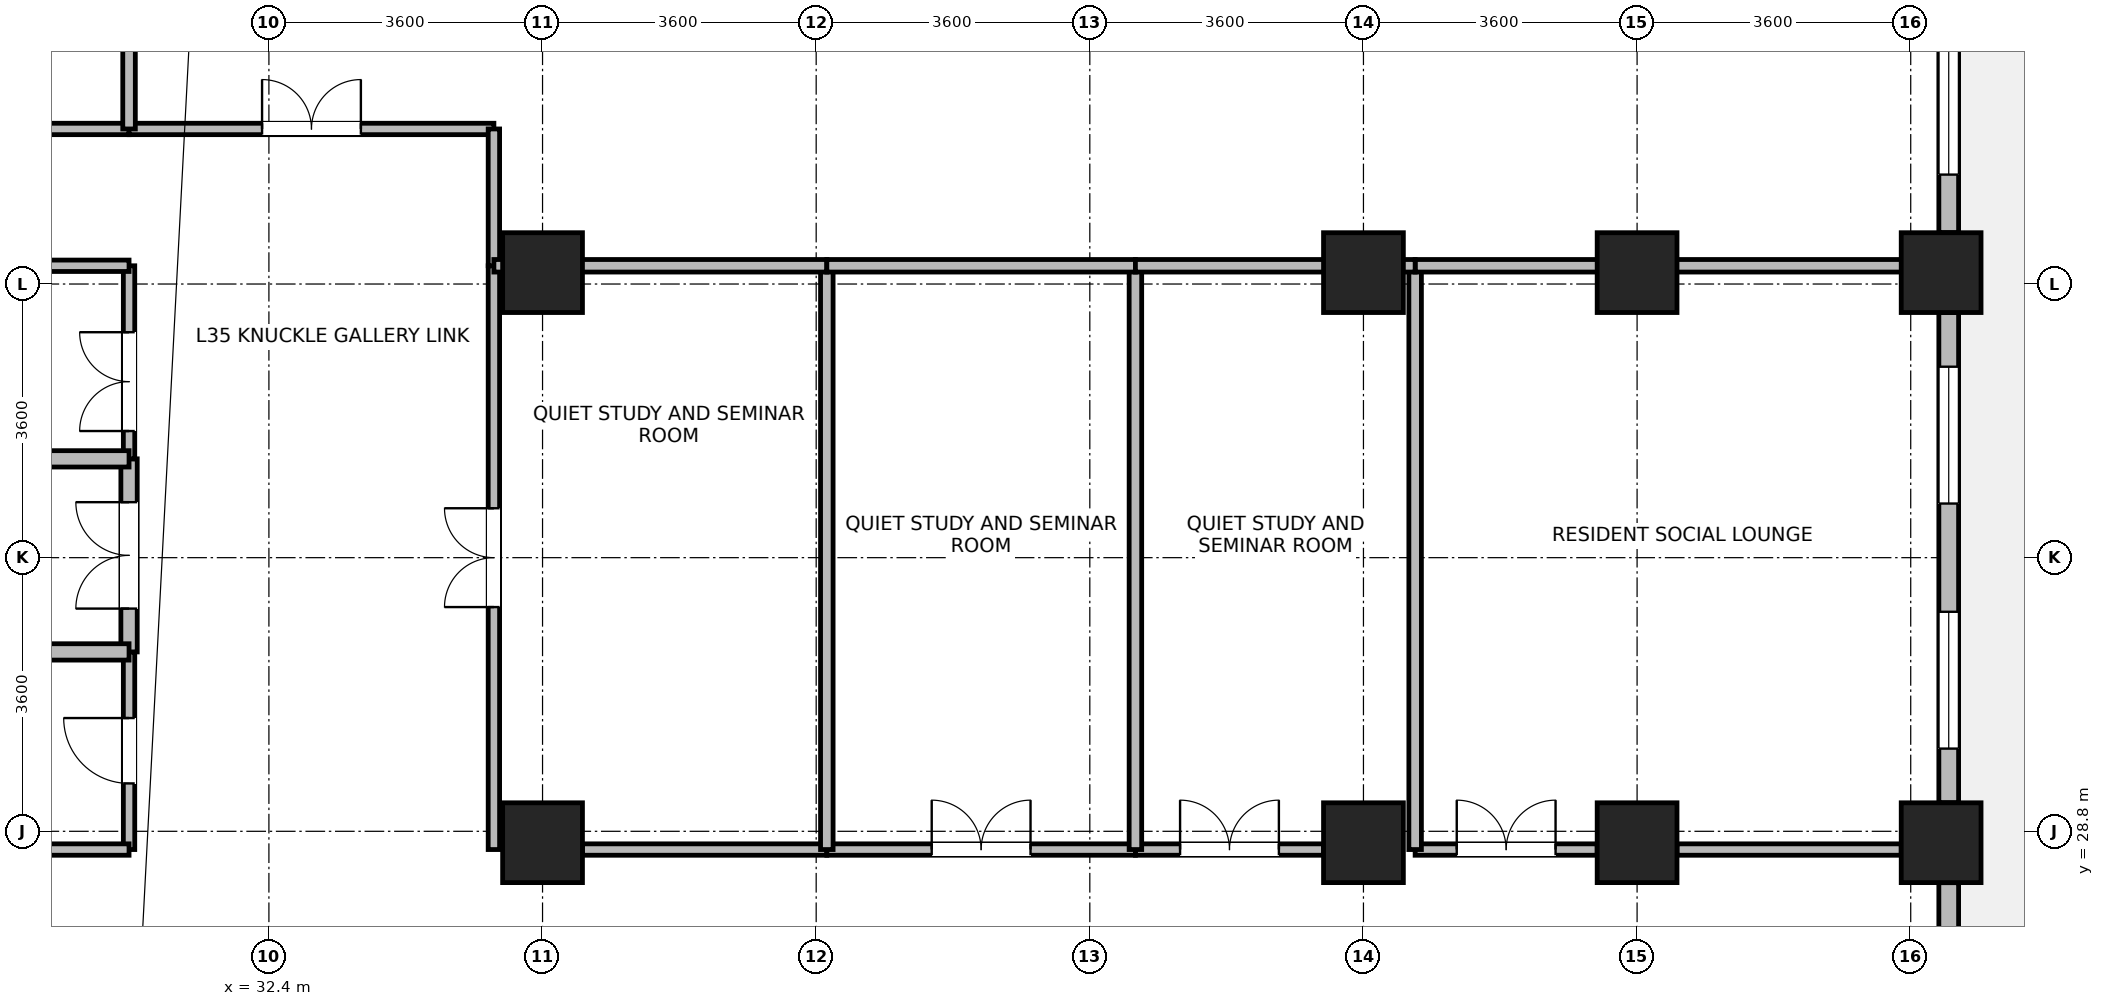
"""IFC4 building model, lengths in metres.
Left out: names, types, materials, properties, quantities, classifications, styles, units other than length and angle.
Written with IfcOpenShell. Run it as: python <this file> out.ifc"""

import sys

from ifc_helpers import new_model, si_unit, direction, frame, frame_2d, origin, origin_2d, place, context, subcontext, project, spatial, rectangle, extrude, source, transform, mapped, element, fill, save


model = new_model("IFC4")
c1 = context("Model", 3, precision=1e-05, world=origin(), true_north=direction((0.0, 1.0)))
c2 = subcontext(c1, "Body", "Model", "MODEL_VIEW")
j1 = project(units=[si_unit("LENGTHUNIT", "METRE"), si_unit("PLANEANGLEUNIT", "RADIAN")], contexts=[c1])
p1 = place(None, origin())
s1 = spatial("IfcSite", under=j1, at=p1, CompositionType="ELEMENT")
p2 = place(p1, origin())
s2 = spatial("IfcBuilding", under=s1, at=p2, CompositionType="ELEMENT")
p3 = place(p2, frame((0.0, 0.0, 140.2)))
s3 = spatial("IfcBuildingStorey", under=s2, at=p3, CompositionType="ELEMENT", Elevation=140.2)
m1 = source(origin(), c2, "Body", "SweptSolid", [
    extrude(rectangle(XDim=1.05, YDim=1.05, at=origin_2d()), origin(), (0.0, 0.0, 1.0), 3.7),
])
for number, where, z_axis, x_axis in (
    (1, (36.0, 28.65, 0.0), (0.0, 0.0, 1.0), (1.0, 0.0, 0.0)),
    (2, (36.0, 36.15, 0.0), (0.0, 0.0, 1.0), (1.0, 0.0, 0.0)),
    (3, (46.8, 28.65, 0.0), (0.0, 0.0, 1.0), (1.0, 0.0, 0.0)),
    (4, (46.8, 36.15, 0.0), (0.0, 0.0, 1.0), (1.0, 0.0, 0.0)),
    (5, (50.4, 28.65, 0.0), (0.0, 0.0, 1.0), (1.0, 0.0, 0.0)),
    (6, (50.4, 36.15, 0.0), (0.0, 0.0, 1.0), (1.0, 0.0, 0.0)),
    (7, (54.4, 28.65, 0.0), (0.0, 0.0, 1.0), (1.0, 0.0, 0.0)),
    (8, (54.4, 36.15, 0.0), (0.0, 0.0, 1.0), (1.0, 0.0, 0.0)),
):
    element("IfcColumn", number, at=place(p3, frame(where, z_axis=z_axis, x_axis=x_axis)), inside=s3, PredefinedType="COLUMN", context=c2, shape_type="MappedRepresentation", body=[
        mapped(m1, transform((0.0, 0.0, 0.0), x_axis=(1.0, 0.0, 0.0), y_axis=(0.0, 1.0, 0.0), z_axis=(0.0, 0.0, 1.0), scale=1.0)),
    ])
p4 = place(p3, frame((54.5, 28.124, 0.0), z_axis=(0.0, 0.0, 1.0), x_axis=(0.0, -1.0, 0.0)))
e9 = element("IfcWall", 9, at=p4, inside=s3, PredefinedType="STANDARD", context=c2, shape_type="SweptSolid", body=[
    extrude(rectangle(XDim=5.998, YDim=0.26, at=frame_2d((2.999, 0.0))), origin(), (0.0, 0.0, 1.0), 2.99),
])
p5 = place(p4, frame((3.598, 0.0, 0.85)))
e10 = element("IfcOpeningElement", 10, at=p5, cuts=e9, PredefinedType="OPENING", context=c2, shape_type="SweptSolid", body=[
    extrude(rectangle(XDim=1.8, YDim=1.85, at=frame_2d((0.9, 0.925))), frame((0.0, 0.14, 0.0), z_axis=(0.0, -1.0, 0.0), x_axis=(1.0, 0.0, 0.0)), (0.0, 0.0, 1.0), 0.28),
])
p6 = place(p4, frame((2.044, 0.0, 0.85)))
e11 = element("IfcOpeningElement", 11, at=p6, cuts=e9, PredefinedType="OPENING", context=c2, shape_type="SweptSolid", body=[
    extrude(rectangle(XDim=0.95, YDim=1.75, at=frame_2d((0.475, 0.875))), frame((0.0, 0.14, 0.0), z_axis=(0.0, -1.0, 0.0), x_axis=(1.0, 0.0, 0.0)), (0.0, 0.0, 1.0), 0.28),
])
p7 = place(p3, frame((54.5, 35.624, 0.0), z_axis=(0.0, 0.0, 1.0), x_axis=(0.0, -1.0, 0.0)))
e12 = element("IfcWall", 12, at=p7, inside=s3, PredefinedType="STANDARD", context=c2, shape_type="SweptSolid", body=[
    extrude(rectangle(XDim=6.448, YDim=0.26, at=frame_2d((3.224, 0.0))), origin(), (0.0, 0.0, 1.0), 2.99),
])
p8 = place(p7, frame((0.712, 0.0, 0.85)))
e13 = element("IfcOpeningElement", 13, at=p8, cuts=e12, PredefinedType="OPENING", context=c2, shape_type="SweptSolid", body=[
    extrude(rectangle(XDim=1.8, YDim=1.85, at=frame_2d((0.9, 0.925))), frame((0.0, 0.14, 0.0), z_axis=(0.0, -1.0, 0.0), x_axis=(1.0, 0.0, 0.0)), (0.0, 0.0, 1.0), 0.28),
])
p9 = place(p7, frame((3.936, 0.0, 0.85)))
e14 = element("IfcOpeningElement", 14, at=p9, cuts=e12, PredefinedType="OPENING", context=c2, shape_type="SweptSolid", body=[
    extrude(rectangle(XDim=1.8, YDim=1.85, at=frame_2d((0.9, 0.925))), frame((0.0, 0.14, 0.0), z_axis=(0.0, -1.0, 0.0), x_axis=(1.0, 0.0, 0.0)), (0.0, 0.0, 1.0), 0.28),
])
p10 = place(p3, frame((54.5, 43.33, 0.0), z_axis=(0.0, 0.0, 1.0), x_axis=(0.0, -1.0, 0.0)))
e15 = element("IfcWall", 15, at=p10, inside=s3, PredefinedType="STANDARD", context=c2, shape_type="SweptSolid", body=[
    extrude(rectangle(XDim=6.654, YDim=0.26, at=frame_2d((3.327, 0.0))), origin(), (0.0, 0.0, 1.0), 3.44),
])
p11 = place(p10, frame((0.763, 0.0, 0.85)))
e16 = element("IfcOpeningElement", 16, at=p11, cuts=e15, PredefinedType="OPENING", context=c2, shape_type="SweptSolid", body=[
    extrude(rectangle(XDim=1.8, YDim=1.85, at=frame_2d((0.9, 0.925))), frame((0.0, 0.14, 0.0), z_axis=(0.0, -1.0, 0.0), x_axis=(1.0, 0.0, 0.0)), (0.0, 0.0, 1.0), 0.28),
])
p12 = place(p10, frame((4.091, 0.0, 0.85)))
e17 = element("IfcOpeningElement", 17, at=p12, cuts=e15, PredefinedType="OPENING", context=c2, shape_type="SweptSolid", body=[
    extrude(rectangle(XDim=1.8, YDim=1.85, at=frame_2d((0.9, 0.925))), frame((0.0, 0.14, 0.0), z_axis=(0.0, -1.0, 0.0), x_axis=(1.0, 0.0, 0.0)), (0.0, 0.0, 1.0), 0.28),
])
p13 = place(p3, frame((35.36, 28.56, 0.0), z_axis=(0.0, 0.0, 1.0), x_axis=(0.0, 1.0, 0.0)))
e18 = element("IfcWall", 18, at=p13, inside=s3, PredefinedType="PARTITIONING", context=c2, shape_type="SweptSolid", body=[
    extrude(rectangle(XDim=7.68, YDim=0.15, at=frame_2d((3.84, 0.0))), origin(), (0.0, 0.0, 1.0), 3.44),
])
p14 = place(p13, frame((3.19, 0.0, 0.0)))
e19 = element("IfcOpeningElement", 19, at=p14, cuts=e18, PredefinedType="OPENING", context=c2, shape_type="SweptSolid", body=[
    extrude(rectangle(XDim=1.3, YDim=2.12, at=frame_2d((0.65, 1.06))), frame((0.0, 0.085, 0.0), z_axis=(0.0, -1.0, 0.0), x_axis=(1.0, 0.0, 0.0)), (0.0, 0.0, 1.0), 0.17),
])
p15 = place(p3, frame((47.48, 28.56, 0.0), z_axis=(0.0, 0.0, 1.0), x_axis=(1.0, 0.0, 0.0)))
e20 = element("IfcWall", 20, at=p15, inside=s3, PredefinedType="PARTITIONING", context=c2, shape_type="SweptSolid", body=[
    extrude(rectangle(XDim=2.395, YDim=0.15, at=frame_2d((1.198, 0.0))), origin(), (0.0, 0.0, 1.0), 2.84),
])
p16 = place(p15, frame((0.548, 0.0, 0.0)))
e21 = element("IfcOpeningElement", 21, at=p16, cuts=e20, PredefinedType="OPENING", context=c2, shape_type="SweptSolid", body=[
    extrude(rectangle(XDim=1.3, YDim=2.12, at=frame_2d((0.65, 1.06))), frame((0.0, 0.085, 0.0), z_axis=(0.0, -1.0, 0.0), x_axis=(1.0, 0.0, 0.0)), (0.0, 0.0, 1.0), 0.17),
])
p17 = place(p3, frame((50.925, 28.56, 0.0), z_axis=(0.0, 0.0, 1.0), x_axis=(1.0, 0.0, 0.0)))
e22 = element("IfcWall", 22, at=p17, inside=s3, PredefinedType="PARTITIONING", context=c2, shape_type="SweptSolid", body=[
    extrude(rectangle(XDim=2.95, YDim=0.15, at=frame_2d((1.475, 0.0))), origin(), (0.0, 0.0, 1.0), 2.84),
])
p18 = place(p3, frame((25.08, 38.04, 0.0), z_axis=(0.0, 0.0, 1.0), x_axis=(1.0, 0.0, 0.0)))
e23 = element("IfcWall", 23, at=p18, inside=s3, PredefinedType="PARTITIONING", context=c2, shape_type="SweptSolid", body=[
    extrude(rectangle(XDim=5.48, YDim=0.15, at=frame_2d((2.74, 0.0))), origin(), (0.0, 0.0, 1.0), 3.44),
])
p19 = place(p18, frame((2.09, 0.0, 0.0)))
e24 = element("IfcOpeningElement", 24, at=p19, cuts=e23, PredefinedType="OPENING", context=c2, shape_type="SweptSolid", body=[
    extrude(rectangle(XDim=1.3, YDim=2.12, at=frame_2d((0.65, 1.06))), frame((0.0, 0.085, 0.0), z_axis=(0.0, -1.0, 0.0), x_axis=(1.0, 0.0, 0.0)), (0.0, 0.0, 1.0), 0.17),
])
p20 = place(p3, frame((30.56, 38.04, 0.0), z_axis=(0.0, 0.0, 1.0), x_axis=(1.0, 0.0, 0.0)))
e25 = element("IfcWall", 25, at=p20, inside=s3, PredefinedType="PARTITIONING", context=c2, shape_type="SweptSolid", body=[
    extrude(rectangle(XDim=4.8, YDim=0.15, at=frame_2d((2.4, 0.0))), origin(), (0.0, 0.0, 1.0), 3.44),
])
p21 = place(p20, frame((1.75, 0.0, 0.0)))
e26 = element("IfcOpeningElement", 26, at=p21, cuts=e25, PredefinedType="OPENING", context=c2, shape_type="SweptSolid", body=[
    extrude(rectangle(XDim=1.3, YDim=2.12, at=frame_2d((0.65, 1.06))), frame((0.0, 0.085, 0.0), z_axis=(0.0, -1.0, 0.0), x_axis=(1.0, 0.0, 0.0)), (0.0, 0.0, 1.0), 0.17),
])
p22 = place(p3, frame((36.525, 28.56, 0.0), z_axis=(0.0, 0.0, 1.0), x_axis=(1.0, 0.0, 0.0)))
e27 = element("IfcWall", 27, at=p22, inside=s3, PredefinedType="PARTITIONING", context=c2, shape_type="SweptSolid", body=[
    extrude(rectangle(XDim=3.215, YDim=0.15, at=frame_2d((1.607, 0.0))), origin(), (0.0, 0.0, 1.0), 2.84),
])
p23 = place(p3, frame((39.74, 28.56, 0.0), z_axis=(0.0, 0.0, 1.0), x_axis=(1.0, 0.0, 0.0)))
e28 = element("IfcWall", 28, at=p23, inside=s3, PredefinedType="PARTITIONING", context=c2, shape_type="SweptSolid", body=[
    extrude(rectangle(XDim=4.06, YDim=0.15, at=frame_2d((2.03, 0.0))), origin(), (0.0, 0.0, 1.0), 2.84),
])
p24 = place(p23, frame((1.38, 0.0, 0.0)))
e29 = element("IfcOpeningElement", 29, at=p24, cuts=e28, PredefinedType="OPENING", context=c2, shape_type="SweptSolid", body=[
    extrude(rectangle(XDim=1.3, YDim=2.12, at=frame_2d((0.65, 1.06))), frame((0.0, 0.085, 0.0), z_axis=(0.0, -1.0, 0.0), x_axis=(1.0, 0.0, 0.0)), (0.0, 0.0, 1.0), 0.17),
])
p25 = place(p3, frame((43.8, 28.56, 0.0), z_axis=(0.0, 0.0, 1.0), x_axis=(1.0, 0.0, 0.0)))
e30 = element("IfcWall", 30, at=p25, inside=s3, PredefinedType="PARTITIONING", context=c2, shape_type="SweptSolid", body=[
    extrude(rectangle(XDim=2.475, YDim=0.15, at=frame_2d((1.237, 0.0))), origin(), (0.0, 0.0, 1.0), 2.84),
])
p26 = place(p25, frame((0.587, 0.0, 0.0)))
e31 = element("IfcOpeningElement", 31, at=p26, cuts=e30, PredefinedType="OPENING", context=c2, shape_type="SweptSolid", body=[
    extrude(rectangle(XDim=1.3, YDim=2.12, at=frame_2d((0.65, 1.06))), frame((0.0, 0.085, 0.0), z_axis=(0.0, -1.0, 0.0), x_axis=(1.0, 0.0, 0.0)), (0.0, 0.0, 1.0), 0.17),
])
p27 = place(p3, frame((30.56, 28.56, 0.0), z_axis=(0.0, 0.0, 1.0), x_axis=(0.0, 1.0, 0.0)))
e32 = element("IfcWall", 32, at=p27, inside=s3, PredefinedType="PARTITIONING", context=c2, shape_type="SweptSolid", body=[
    extrude(rectangle(XDim=2.6, YDim=0.15, at=frame_2d((1.3, 0.0))), origin(), (0.0, 0.0, 1.0), 3.44),
])
p28 = place(p27, frame((0.87, 0.0, 0.0)))
e33 = element("IfcOpeningElement", 33, at=p28, cuts=e32, PredefinedType="OPENING", context=c2, shape_type="SweptSolid", body=[
    extrude(rectangle(XDim=0.86, YDim=2.02, at=frame_2d((0.43, 1.01))), frame((0.0, 0.085, 0.0), z_axis=(0.0, -1.0, 0.0), x_axis=(1.0, 0.0, 0.0)), (0.0, 0.0, 1.0), 0.17),
])
p29 = place(p3, frame((30.56, 31.16, 0.0), z_axis=(0.0, 0.0, 1.0), x_axis=(0.0, 1.0, 0.0)))
e34 = element("IfcWall", 34, at=p29, inside=s3, PredefinedType="PARTITIONING", context=c2, shape_type="SweptSolid", body=[
    extrude(rectangle(XDim=2.54, YDim=0.215, at=frame_2d((1.27, 0.0))), origin(), (0.0, 0.0, 1.0), 3.44),
])
p30 = place(p29, frame((0.57, 0.0, 0.0)))
e35 = element("IfcOpeningElement", 35, at=p30, cuts=e34, PredefinedType="OPENING", context=c2, shape_type="SweptSolid", body=[
    extrude(rectangle(XDim=1.4, YDim=2.15, at=frame_2d((0.7, 1.075))), frame((0.0, 0.118, 0.0), z_axis=(0.0, -1.0, 0.0), x_axis=(1.0, 0.0, 0.0)), (0.0, 0.0, 1.0), 0.235),
])
p31 = place(p3, frame((30.56, 33.7, 0.0), z_axis=(0.0, 0.0, 1.0), x_axis=(0.0, 1.0, 0.0)))
e36 = element("IfcWall", 36, at=p31, inside=s3, PredefinedType="PARTITIONING", context=c2, shape_type="SweptSolid", body=[
    extrude(rectangle(XDim=2.54, YDim=0.15, at=frame_2d((1.27, 0.0))), origin(), (0.0, 0.0, 1.0), 3.44),
])
p32 = place(p31, frame((0.366, 0.0, 0.0)))
e37 = element("IfcOpeningElement", 37, at=p32, cuts=e36, PredefinedType="OPENING", context=c2, shape_type="SweptSolid", body=[
    extrude(rectangle(XDim=1.3, YDim=2.12, at=frame_2d((0.65, 1.06))), frame((0.0, 0.085, 0.0), z_axis=(0.0, -1.0, 0.0), x_axis=(1.0, 0.0, 0.0)), (0.0, 0.0, 1.0), 0.17),
])
p33 = place(p3, frame((35.36, 36.24, 0.0), z_axis=(0.0, 0.0, 1.0), x_axis=(0.0, 1.0, 0.0)))
e38 = element("IfcWall", 38, at=p33, inside=s3, PredefinedType="PARTITIONING", context=c2, shape_type="SweptSolid", body=[
    extrude(rectangle(XDim=1.8, YDim=0.15, at=frame_2d((0.9, 0.0))), origin(), (0.0, 0.0, 1.0), 3.44),
])
for number, where, z_axis, x_axis in (
    (39, (29.325, 28.56, 0.0), (0.0, 0.0, 1.0), (1.0, 0.0, 0.0)),
    (40, (29.325, 36.24, 0.0), (0.0, 0.0, 1.0), (1.0, 0.0, 0.0)),
):
    element("IfcWall", number, at=place(p3, frame(where, z_axis=z_axis, x_axis=x_axis)), inside=s3, PredefinedType="PARTITIONING", context=c2, shape_type="SweptSolid", body=[
        extrude(rectangle(XDim=1.235, YDim=0.15, at=frame_2d((0.618, 0.0))), origin(), (0.0, 0.0, 1.0), 2.84),
    ])
for number, where, z_axis, x_axis in (
    (41, (39.74, 28.56, 0.0), (0.0, 0.0, 1.0), (0.0, 1.0, 0.0)),
    (42, (43.8, 28.56, 0.0), (0.0, 0.0, 1.0), (0.0, 1.0, 0.0)),
    (43, (47.48, 28.56, 0.0), (0.0, 0.0, 1.0), (0.0, 1.0, 0.0)),
):
    element("IfcWall", number, at=place(p3, frame(where, z_axis=z_axis, x_axis=x_axis)), inside=s3, PredefinedType="PARTITIONING", context=c2, shape_type="SweptSolid", body=[
        extrude(rectangle(XDim=7.68, YDim=0.165, at=frame_2d((3.84, 0.0))), origin(), (0.0, 0.0, 1.0), 3.44),
    ])
p34 = place(p3, frame((47.48, 36.24, 0.0), z_axis=(0.0, 0.0, 1.0), x_axis=(1.0, 0.0, 0.0)))
e44 = element("IfcWall", 44, at=p34, inside=s3, PredefinedType="PARTITIONING", context=c2, shape_type="SweptSolid", body=[
    extrude(rectangle(XDim=6.888, YDim=0.165, at=frame_2d((3.444, 0.0))), origin(), (0.0, 0.0, 1.0), 2.84),
])
p35 = place(p3, frame((30.56, 38.04, 0.0), z_axis=(0.0, 0.0, 1.0), x_axis=(0.0, 1.0, 0.0)))
e45 = element("IfcWall", 45, at=p35, inside=s3, PredefinedType="PARTITIONING", context=c2, shape_type="SweptSolid", body=[
    extrude(rectangle(XDim=5.028, YDim=0.165, at=frame_2d((2.514, 0.0))), origin(), (0.0, 0.0, 1.0), 3.44),
])
p36 = place(p3, frame((35.36, 36.24, 0.0), z_axis=(0.0, 0.0, 1.0), x_axis=(1.0, 0.0, 0.0)))
e46 = element("IfcWall", 46, at=p36, inside=s3, PredefinedType="PARTITIONING", context=c2, shape_type="SweptSolid", body=[
    extrude(rectangle(XDim=4.38, YDim=0.165, at=frame_2d((2.19, 0.0))), origin(), (0.0, 0.0, 1.0), 2.84),
])
p37 = place(p3, frame((39.74, 36.24, 0.0), z_axis=(0.0, 0.0, 1.0), x_axis=(1.0, 0.0, 0.0)))
e47 = element("IfcWall", 47, at=p37, inside=s3, PredefinedType="PARTITIONING", context=c2, shape_type="SweptSolid", body=[
    extrude(rectangle(XDim=4.06, YDim=0.165, at=frame_2d((2.03, 0.0))), origin(), (0.0, 0.0, 1.0), 2.84),
])
p38 = place(p3, frame((43.8, 36.24, 0.0), z_axis=(0.0, 0.0, 1.0), x_axis=(1.0, 0.0, 0.0)))
e48 = element("IfcWall", 48, at=p38, inside=s3, PredefinedType="PARTITIONING", context=c2, shape_type="SweptSolid", body=[
    extrude(rectangle(XDim=3.68, YDim=0.165, at=frame_2d((1.84, 0.0))), origin(), (0.0, 0.0, 1.0), 2.84),
])
for number, where, z_axis, x_axis in (
    (49, (28.84, 31.16, 0.0), (0.0, 0.0, 1.0), (1.0, 0.0, 0.0)),
    (50, (28.84, 33.7, 0.0), (0.0, 0.0, 1.0), (1.0, 0.0, 0.0)),
):
    element("IfcWall", number, at=place(p3, frame(where, z_axis=z_axis, x_axis=x_axis)), inside=s3, PredefinedType="PARTITIONING", context=c2, shape_type="SweptSolid", body=[
        extrude(rectangle(XDim=1.72, YDim=0.215, at=frame_2d((0.86, 0.0))), origin(), (0.0, 0.0, 1.0), 3.44),
    ])
p39 = place(p8, origin())
e51 = element("IfcWindow", 51, at=p39, inside=s3, PartitioningType="SINGLE_PANEL", PredefinedType="WINDOW", context=c2, shape_type="SweptSolid", body=[
    extrude(rectangle(XDim=1.8, YDim=1.85, at=frame_2d((0.9, 0.925))), frame((0.0, 0.03, 0.0), z_axis=(0.0, -1.0, 0.0), x_axis=(1.0, 0.0, 0.0)), (0.0, 0.0, 1.0), 0.06),
])
fill(e13, e51)
p40 = place(p9, origin())
e52 = element("IfcWindow", 52, at=p40, inside=s3, PartitioningType="SINGLE_PANEL", PredefinedType="WINDOW", context=c2, shape_type="SweptSolid", body=[
    extrude(rectangle(XDim=1.8, YDim=1.85, at=frame_2d((0.9, 0.925))), frame((0.0, 0.03, 0.0), z_axis=(0.0, -1.0, 0.0), x_axis=(1.0, 0.0, 0.0)), (0.0, 0.0, 1.0), 0.06),
])
fill(e14, e52)
p41 = place(p12, origin())
e53 = element("IfcWindow", 53, at=p41, inside=s3, PartitioningType="SINGLE_PANEL", PredefinedType="WINDOW", context=c2, shape_type="SweptSolid", body=[
    extrude(rectangle(XDim=1.8, YDim=1.85, at=frame_2d((0.9, 0.925))), frame((0.0, 0.03, 0.0), z_axis=(0.0, -1.0, 0.0), x_axis=(1.0, 0.0, 0.0)), (0.0, 0.0, 1.0), 0.06),
])
fill(e17, e53)
p42 = place(p14, origin())
e54 = element("IfcDoor", 54, at=p42, inside=s3, OperationType="DOUBLE_DOOR_SINGLE_SWING", PredefinedType="DOOR", context=c2, shape_type="SweptSolid", body=[
    extrude(rectangle(XDim=1.3, YDim=2.12, at=frame_2d((0.65, 1.06))), frame((0.0, 0.025, 0.0), z_axis=(0.0, -1.0, 0.0), x_axis=(1.0, 0.0, 0.0)), (0.0, 0.0, 1.0), 0.05),
])
fill(e19, e54)
p43 = place(p16, origin())
e55 = element("IfcDoor", 55, at=p43, inside=s3, OperationType="DOUBLE_DOOR_SINGLE_SWING", PredefinedType="DOOR", context=c2, shape_type="SweptSolid", body=[
    extrude(rectangle(XDim=1.3, YDim=2.12, at=frame_2d((0.65, 1.06))), frame((0.0, 0.025, 0.0), z_axis=(0.0, -1.0, 0.0), x_axis=(1.0, 0.0, 0.0)), (0.0, 0.0, 1.0), 0.05),
])
fill(e21, e55)
p44 = place(p21, origin())
e56 = element("IfcDoor", 56, at=p44, inside=s3, OperationType="DOUBLE_DOOR_SINGLE_SWING", PredefinedType="DOOR", context=c2, shape_type="SweptSolid", body=[
    extrude(rectangle(XDim=1.3, YDim=2.12, at=frame_2d((0.65, 1.06))), frame((0.0, 0.025, 0.0), z_axis=(0.0, -1.0, 0.0), x_axis=(1.0, 0.0, 0.0)), (0.0, 0.0, 1.0), 0.05),
])
fill(e26, e56)
p45 = place(p24, origin())
e57 = element("IfcDoor", 57, at=p45, inside=s3, OperationType="DOUBLE_DOOR_SINGLE_SWING", PredefinedType="DOOR", context=c2, shape_type="SweptSolid", body=[
    extrude(rectangle(XDim=1.3, YDim=2.12, at=frame_2d((0.65, 1.06))), frame((0.0, 0.025, 0.0), z_axis=(0.0, -1.0, 0.0), x_axis=(1.0, 0.0, 0.0)), (0.0, 0.0, 1.0), 0.05),
])
fill(e29, e57)
p46 = place(p26, origin())
e58 = element("IfcDoor", 58, at=p46, inside=s3, OperationType="DOUBLE_DOOR_SINGLE_SWING", PredefinedType="DOOR", context=c2, shape_type="SweptSolid", body=[
    extrude(rectangle(XDim=1.3, YDim=2.12, at=frame_2d((0.65, 1.06))), frame((0.0, 0.025, 0.0), z_axis=(0.0, -1.0, 0.0), x_axis=(1.0, 0.0, 0.0)), (0.0, 0.0, 1.0), 0.05),
])
fill(e31, e58)
p47 = place(p28, origin())
e59 = element("IfcDoor", 59, at=p47, inside=s3, OperationType="SINGLE_SWING_RIGHT", PredefinedType="DOOR", context=c2, shape_type="SweptSolid", body=[
    extrude(rectangle(XDim=0.86, YDim=2.02, at=frame_2d((0.43, 1.01))), frame((0.0, 0.025, 0.0), z_axis=(0.0, -1.0, 0.0), x_axis=(1.0, 0.0, 0.0)), (0.0, 0.0, 1.0), 0.05),
])
fill(e33, e59)
p48 = place(p30, origin())
e60 = element("IfcDoor", 60, at=p48, inside=s3, OperationType="DOUBLE_DOOR_SINGLE_SWING", PredefinedType="DOOR", context=c2, shape_type="SweptSolid", body=[
    extrude(rectangle(XDim=1.4, YDim=2.15, at=frame_2d((0.7, 1.075))), frame((0.0, 0.025, 0.0), z_axis=(0.0, -1.0, 0.0), x_axis=(1.0, 0.0, 0.0)), (0.0, 0.0, 1.0), 0.05),
])
fill(e35, e60)
p49 = place(p32, origin())
e61 = element("IfcDoor", 61, at=p49, inside=s3, OperationType="DOUBLE_DOOR_SINGLE_SWING", PredefinedType="DOOR", context=c2, shape_type="SweptSolid", body=[
    extrude(rectangle(XDim=1.3, YDim=2.12, at=frame_2d((0.65, 1.06))), frame((0.0, 0.025, 0.0), z_axis=(0.0, -1.0, 0.0), x_axis=(1.0, 0.0, 0.0)), (0.0, 0.0, 1.0), 0.05),
])
fill(e37, e61)
save(model, sys.argv[1])
